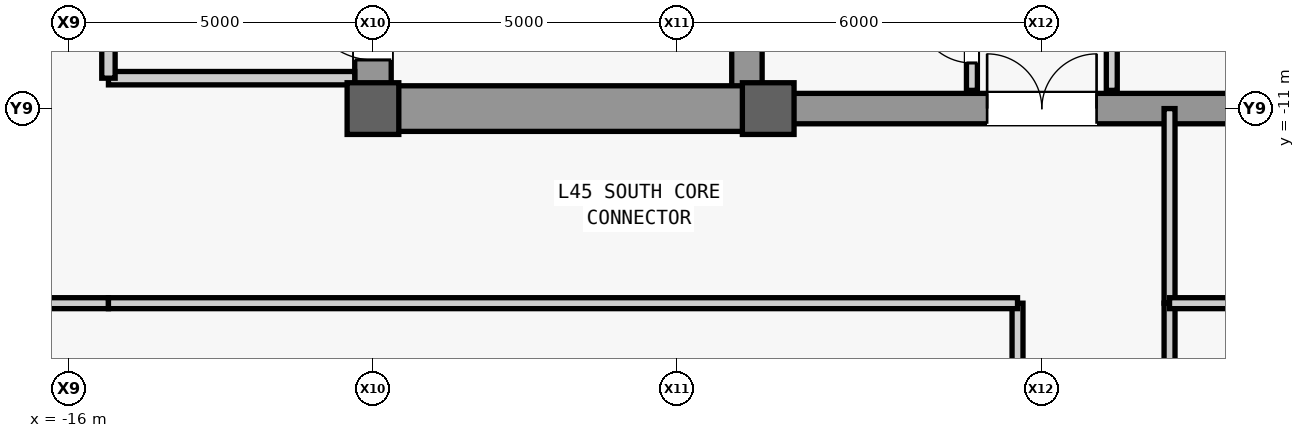
"""IFC4 building model, lengths in metres.
Left out: names, types, materials, properties, quantities, classifications, styles, units other than length and angle.
Written with IfcOpenShell. Run it as: python <this file> out.ifc"""

import sys

from ifc_helpers import new_model, si_unit, direction, frame, frame_2d, origin, origin_2d, place, context, subcontext, project, spatial, rectangle, extrude, source, transform, mapped, element, fill, save


model = new_model("IFC4")
c1 = context("Model", 3, precision=1e-05, world=origin(), true_north=direction((0.0, 1.0)))
c2 = subcontext(c1, "Body", "Model", "MODEL_VIEW")
j1 = project(units=[si_unit("LENGTHUNIT", "METRE"), si_unit("PLANEANGLEUNIT", "RADIAN")], contexts=[c1])
p1 = place(None, origin())
s1 = spatial("IfcSite", under=j1, at=p1, CompositionType="ELEMENT")
p2 = place(p1, origin())
s2 = spatial("IfcBuilding", under=s1, at=p2, CompositionType="ELEMENT")
p3 = place(p2, frame((0.0, 0.0, 195.1)))
s3 = spatial("IfcBuildingStorey", under=s2, at=p3, CompositionType="ELEMENT", Elevation=195.1)
m1 = source(origin(), c2, "Body", "SweptSolid", [
    extrude(rectangle(XDim=22.0, YDim=0.6, at=frame_2d((11.0, 0.0))), origin(), (0.0, 0.0, 1.0), 3.78),
])
p4 = place(p3, frame((-11.0, -11.0, 0.0), z_axis=(0.0, 0.0, 1.0), x_axis=(0.0, 1.0, 0.0)))
e1 = element("IfcWall", 1, at=p4, inside=s3, PredefinedType="SHEAR", context=c2, shape_type="MappedRepresentation", body=[
    mapped(m1, transform((0.0, 0.0, 0.0), scale=1.0)),
])
m2 = source(origin(), c2, "Body", "SweptSolid", [
    extrude(rectangle(XDim=1.1, YDim=2.2, at=frame_2d((0.55, 1.1))), frame((0.0, 0.31, 0.0), z_axis=(0.0, -1.0, 0.0), x_axis=(1.0, 0.0, 0.0)), (0.0, 0.0, 1.0), 0.62),
])
p5 = place(p4, frame((0.8, 0.0, 0.0)))
e2 = element("IfcOpeningElement", 2, at=p5, cuts=e1, PredefinedType="OPENING", context=c2, shape_type="MappedRepresentation", body=[
    mapped(m2, transform((0.0, 0.0, 0.0), scale=1.0)),
])
p6 = place(p4, frame((12.5, 0.0, 0.0)))
e3 = element("IfcOpeningElement", 3, at=p6, cuts=e1, PredefinedType="OPENING", context=c2, shape_type="MappedRepresentation", body=[
    mapped(m2, transform((0.0, 0.0, 0.0), scale=1.0)),
])
m3 = source(origin(), c2, "Body", "SweptSolid", [
    extrude(rectangle(XDim=0.9, YDim=2.15, at=frame_2d((0.45, 1.075))), frame((0.0, 0.31, 0.0), z_axis=(0.0, -1.0, 0.0), x_axis=(1.0, 0.0, 0.0)), (0.0, 0.0, 1.0), 0.62),
])
p7 = place(p4, frame((6.2, 0.0, 0.0)))
e4 = element("IfcOpeningElement", 4, at=p7, cuts=e1, PredefinedType="OPENING", context=c2, shape_type="MappedRepresentation", body=[
    mapped(m3, transform((0.0, 0.0, 0.0), scale=1.0)),
])
p8 = place(p4, frame((8.525, 0.0, 0.0)))
e5 = element("IfcOpeningElement", 5, at=p8, cuts=e1, PredefinedType="OPENING", context=c2, shape_type="MappedRepresentation", body=[
    mapped(m3, transform((0.0, 0.0, 0.0), scale=1.0)),
])
m4 = source(origin(), c2, "Body", "SweptSolid", [
    extrude(rectangle(XDim=1.3, YDim=2.3, at=frame_2d((0.65, 1.15))), frame((0.0, 0.31, 0.0), z_axis=(0.0, -1.0, 0.0), x_axis=(1.0, 0.0, 0.0)), (0.0, 0.0, 1.0), 0.62),
])
p9 = place(p4, frame((2.7, 0.0, 0.0)))
e6 = element("IfcOpeningElement", 6, at=p9, cuts=e1, PredefinedType="OPENING", context=c2, shape_type="MappedRepresentation", body=[
    mapped(m4, transform((0.0, 0.0, 0.0), scale=1.0)),
])
m5 = source(origin(), c2, "Body", "SweptSolid", [
    extrude(rectangle(XDim=21.4, YDim=0.5, at=frame_2d((10.7, 0.0))), origin(), (0.0, 0.0, 1.0), 3.78),
])
p10 = place(p3, frame((-4.85, -10.7, 0.0), z_axis=(0.0, 0.0, 1.0), x_axis=(0.0, 1.0, 0.0)))
e7 = element("IfcWall", 7, at=p10, inside=s3, PredefinedType="SHEAR", context=c2, shape_type="MappedRepresentation", body=[
    mapped(m5, transform((0.0, 0.0, 0.0), scale=1.0)),
])
m6 = source(origin(), c2, "Body", "SweptSolid", [
    extrude(rectangle(XDim=5.85, YDim=0.75, at=frame_2d((2.925, 0.0))), origin(), (0.0, 0.0, 1.0), 3.78),
])
p11 = place(p3, frame((-10.7, -11.0, 0.0), z_axis=(0.0, 0.0, 1.0), x_axis=(1.0, 0.0, 0.0)))
e8 = element("IfcWall", 8, at=p11, inside=s3, PredefinedType="SHEAR", context=c2, shape_type="MappedRepresentation", body=[
    mapped(m6, transform((0.0, 0.0, 0.0), scale=1.0)),
])
m7 = source(origin(), c2, "Body", "SweptSolid", [
    extrude(rectangle(XDim=9.2, YDim=0.5, at=frame_2d((4.6, 0.0))), origin(), (0.0, 0.0, 1.0), 3.78),
])
p12 = place(p3, frame((-4.6, -11.0, 0.0), z_axis=(0.0, 0.0, 1.0), x_axis=(1.0, 0.0, 0.0)))
e9 = element("IfcWall", 9, at=p12, inside=s3, PredefinedType="SHEAR", context=c2, shape_type="MappedRepresentation", body=[
    mapped(m7, transform((0.0, 0.0, 0.0), scale=1.0)),
])
m8 = source(origin(), c2, "Body", "SweptSolid", [
    extrude(rectangle(XDim=1.8, YDim=2.25, at=frame_2d((0.9, 1.125))), frame((0.0, 0.26, 0.0), z_axis=(0.0, -1.0, 0.0), x_axis=(1.0, 0.0, 0.0)), (0.0, 0.0, 1.0), 0.52),
])
p13 = place(p12, frame((3.7, 0.0, 0.0)))
e10 = element("IfcOpeningElement", 10, at=p13, cuts=e9, PredefinedType="OPENING", context=c2, shape_type="MappedRepresentation", body=[
    mapped(m8, transform((0.0, 0.0, 0.0), scale=1.0)),
])
m9 = source(origin(), c2, "Body", "SweptSolid", [
    extrude(rectangle(XDim=0.85, YDim=0.85, at=origin_2d()), origin(), (0.0, 0.0, 1.0), 4.0),
])
for number, where, z_axis, x_axis in (
    (11, (-11.0, -11.0, 0.0), (0.0, 0.0, 1.0), (1.0, 0.0, 0.0)),
    (12, (-4.5, -11.0, 0.0), (0.0, 0.0, 1.0), (1.0, 0.0, 0.0)),
):
    element("IfcColumn", number, at=place(p3, frame(where, z_axis=z_axis, x_axis=x_axis)), inside=s3, PredefinedType="COLUMN", context=c2, shape_type="MappedRepresentation", body=[
        mapped(m9, transform((0.0, 0.0, 0.0), scale=1.0)),
    ])
m10 = source(origin(), c2, "Body", "SweptSolid", [
    extrude(rectangle(XDim=4.05, YDim=0.22, at=frame_2d((2.025, 0.0))), origin(), (0.0, 0.0, 1.0), 3.78),
])
p14 = place(p3, frame((-15.35, -10.5, 0.0), z_axis=(0.0, 0.0, 1.0), x_axis=(1.0, 0.0, 0.0)))
e13 = element("IfcWall", 13, at=p14, inside=s3, PredefinedType="PARTITIONING", context=c2, shape_type="MappedRepresentation", body=[
    mapped(m10, transform((0.0, 0.0, 0.0), scale=1.0)),
])
m11 = source(origin(), c2, "Body", "SweptSolid", [
    extrude(rectangle(XDim=4.4, YDim=0.22, at=frame_2d((2.2, 0.0))), origin(), (0.0, 0.0, 1.0), 3.78),
])
p15 = place(p3, frame((-15.35, -10.5, 0.0), z_axis=(0.0, 0.0, 1.0), x_axis=(0.0, 1.0, 0.0)))
e14 = element("IfcWall", 14, at=p15, inside=s3, PredefinedType="PARTITIONING", context=c2, shape_type="MappedRepresentation", body=[
    mapped(m11, transform((0.0, 0.0, 0.0), scale=1.0)),
])
m12 = source(origin(), c2, "Body", "SweptSolid", [
    extrude(rectangle(XDim=1.2, YDim=2.2, at=frame_2d((0.6, 1.1))), frame((0.0, 0.12, 0.0), z_axis=(0.0, -1.0, 0.0), x_axis=(1.0, 0.0, 0.0)), (0.0, 0.0, 1.0), 0.24),
])
p16 = place(p15, frame((1.6, 0.0, 0.0)))
e15 = element("IfcOpeningElement", 15, at=p16, cuts=e14, PredefinedType="OPENING", context=c2, shape_type="MappedRepresentation", body=[
    mapped(m12, transform((0.0, 0.0, 0.0), scale=1.0)),
])
m13 = source(origin(), c2, "Body", "SweptSolid", [
    extrude(rectangle(XDim=5.4, YDim=0.18, at=frame_2d((2.7, 0.0))), origin(), (0.0, 0.0, 1.0), 3.78),
])
p17 = place(p3, frame((-1.15, -10.7, 0.0), z_axis=(0.0, 0.0, 1.0), x_axis=(0.0, 1.0, 0.0)))
e16 = element("IfcWall", 16, at=p17, inside=s3, PredefinedType="PARTITIONING", context=c2, shape_type="MappedRepresentation", body=[
    mapped(m13, transform((0.0, 0.0, 0.0), scale=1.0)),
])
m14 = source(origin(), c2, "Body", "SweptSolid", [
    extrude(rectangle(XDim=0.9, YDim=2.15, at=frame_2d((0.45, 1.075))), frame((0.0, 0.1, 0.0), z_axis=(0.0, -1.0, 0.0), x_axis=(1.0, 0.0, 0.0)), (0.0, 0.0, 1.0), 0.2),
])
p18 = place(p17, frame((0.45, 0.0, 0.0)))
e17 = element("IfcOpeningElement", 17, at=p18, cuts=e16, PredefinedType="OPENING", context=c2, shape_type="MappedRepresentation", body=[
    mapped(m14, transform((0.0, 0.0, 0.0), scale=1.0)),
])
p19 = place(p17, frame((2.25, 0.0, 0.0)))
e18 = element("IfcOpeningElement", 18, at=p19, cuts=e16, PredefinedType="OPENING", context=c2, shape_type="MappedRepresentation", body=[
    mapped(m14, transform((0.0, 0.0, 0.0), scale=1.0)),
])
p20 = place(p17, frame((4.05, 0.0, 0.0)))
e19 = element("IfcOpeningElement", 19, at=p20, cuts=e16, PredefinedType="OPENING", context=c2, shape_type="MappedRepresentation", body=[
    mapped(m14, transform((0.0, 0.0, 0.0), scale=1.0)),
])
p21 = place(p3, frame((1.15, -10.7, 0.0), z_axis=(0.0, 0.0, 1.0), x_axis=(0.0, 1.0, 0.0)))
e20 = element("IfcWall", 20, at=p21, inside=s3, PredefinedType="PARTITIONING", context=c2, shape_type="MappedRepresentation", body=[
    mapped(m13, transform((0.0, 0.0, 0.0), scale=1.0)),
])
p22 = place(p21, frame((0.95, 0.0, 0.0)))
e21 = element("IfcOpeningElement", 21, at=p22, cuts=e20, PredefinedType="OPENING", context=c2, shape_type="MappedRepresentation", body=[
    mapped(m14, transform((0.0, 0.0, 0.0), scale=1.0)),
])
p23 = place(p21, frame((3.65, 0.0, 0.0)))
e22 = element("IfcOpeningElement", 22, at=p23, cuts=e20, PredefinedType="OPENING", context=c2, shape_type="MappedRepresentation", body=[
    mapped(m14, transform((0.0, 0.0, 0.0), scale=1.0)),
])
m15 = source(origin(), c2, "Body", "SweptSolid", [
    extrude(rectangle(XDim=2.45, YDim=0.18, at=frame_2d((1.225, 0.0))), origin(), (0.0, 0.0, 1.0), 3.78),
])
p24 = place(p3, frame((-17.8, -14.2, 0.0), z_axis=(0.0, 0.0, 1.0), x_axis=(1.0, 0.0, 0.0)))
e23 = element("IfcWall", 23, at=p24, inside=s3, PredefinedType="PARTITIONING", context=c2, shape_type="MappedRepresentation", body=[
    mapped(m15, transform((0.0, 0.0, 0.0), scale=1.0)),
])
m16 = source(origin(), c2, "Body", "SweptSolid", [
    extrude(rectangle(XDim=3.2, YDim=0.18, at=frame_2d((1.6, 0.0))), origin(), (0.0, 0.0, 1.0), 3.78),
])
p25 = place(p3, frame((2.1, -14.2, 0.0), z_axis=(0.0, 0.0, 1.0), x_axis=(0.0, 1.0, 0.0)))
e24 = element("IfcWall", 24, at=p25, inside=s3, PredefinedType="PARTITIONING", context=c2, shape_type="MappedRepresentation", body=[
    mapped(m16, transform((0.0, 0.0, 0.0), scale=1.0)),
])
m17 = source(origin(), c2, "Body", "SweptSolid", [
    extrude(rectangle(XDim=15.8, YDim=0.18, at=frame_2d((7.9, 0.0))), origin(), (0.0, 0.0, 1.0), 3.78),
])
p26 = place(p3, frame((-0.4, -30.0, 0.0), z_axis=(0.0, 0.0, 1.0), x_axis=(0.0, 1.0, 0.0)))
e25 = element("IfcWall", 25, at=p26, inside=s3, PredefinedType="PARTITIONING", context=c2, shape_type="MappedRepresentation", body=[
    mapped(m17, transform((0.0, 0.0, 0.0), scale=1.0)),
])
m18 = source(origin(), c2, "Body", "SweptSolid", [
    extrude(rectangle(XDim=1.05, YDim=2.2, at=frame_2d((0.525, 1.1))), frame((0.0, 0.1, 0.0), z_axis=(0.0, -1.0, 0.0), x_axis=(1.0, 0.0, 0.0)), (0.0, 0.0, 1.0), 0.2),
])
p27 = place(p26, frame((3.425, 0.0, 0.0)))
e26 = element("IfcOpeningElement", 26, at=p27, cuts=e25, PredefinedType="OPENING", context=c2, shape_type="MappedRepresentation", body=[
    mapped(m18, transform((0.0, 0.0, 0.0), scale=1.0)),
])
m19 = source(origin(), c2, "Body", "SweptSolid", [
    extrude(rectangle(XDim=14.95, YDim=0.18, at=frame_2d((7.475, 0.0))), origin(), (0.0, 0.0, 1.0), 3.78),
])
p28 = place(p3, frame((-15.35, -14.2, 0.0), z_axis=(0.0, 0.0, 1.0), x_axis=(1.0, 0.0, 0.0)))
e27 = element("IfcWall", 27, at=p28, inside=s3, PredefinedType="PARTITIONING", context=c2, shape_type="MappedRepresentation", body=[
    mapped(m19, transform((0.0, 0.0, 0.0), scale=1.0)),
])
p29 = place(p3, frame((2.1, -30.0, 0.0), z_axis=(0.0, 0.0, 1.0), x_axis=(0.0, 1.0, 0.0)))
e28 = element("IfcWall", 28, at=p29, inside=s3, PredefinedType="PARTITIONING", context=c2, shape_type="MappedRepresentation", body=[
    mapped(m17, transform((0.0, 0.0, 0.0), scale=1.0)),
])
p30 = place(p29, frame((3.425, 0.0, 0.0)))
e29 = element("IfcOpeningElement", 29, at=p30, cuts=e28, PredefinedType="OPENING", context=c2, shape_type="MappedRepresentation", body=[
    mapped(m18, transform((0.0, 0.0, 0.0), scale=1.0)),
])
m20 = source(origin(), c2, "Body", "SweptSolid", [
    extrude(rectangle(XDim=13.25, YDim=0.18, at=frame_2d((6.625, 0.0))), origin(), (0.0, 0.0, 1.0), 3.78),
])
p31 = place(p3, frame((2.1, -14.2, 0.0), z_axis=(0.0, 0.0, 1.0), x_axis=(1.0, 0.0, 0.0)))
e30 = element("IfcWall", 30, at=p31, inside=s3, PredefinedType="PARTITIONING", context=c2, shape_type="MappedRepresentation", body=[
    mapped(m20, transform((0.0, 0.0, 0.0), scale=1.0)),
])
m21 = source(origin(), c2, "Body", "SweptSolid", [
    extrude(rectangle(XDim=1.1, YDim=2.2, at=frame_2d((0.55, 1.1))), frame((0.0, 0.025, 0.0), z_axis=(0.0, -1.0, 0.0), x_axis=(1.0, 0.0, 0.0)), (0.0, 0.0, 1.0), 0.05),
])
p32 = place(p5, origin())
e31 = element("IfcDoor", 31, at=p32, inside=s3, OperationType="SINGLE_SWING_RIGHT", PredefinedType="DOOR", context=c2, shape_type="MappedRepresentation", body=[
    mapped(m21, transform((0.0, 0.0, 0.0), scale=1.0)),
])
fill(e2, e31)
m22 = source(origin(), c2, "Body", "SweptSolid", [
    extrude(rectangle(XDim=0.9, YDim=2.15, at=frame_2d((0.45, 1.075))), frame((0.0, 0.025, 0.0), z_axis=(0.0, -1.0, 0.0), x_axis=(1.0, 0.0, 0.0)), (0.0, 0.0, 1.0), 0.05),
])
p33 = place(p18, origin())
e32 = element("IfcDoor", 32, at=p33, inside=s3, OperationType="SINGLE_SWING_RIGHT", PredefinedType="DOOR", context=c2, shape_type="MappedRepresentation", body=[
    mapped(m22, transform((0.0, 0.0, 0.0), scale=1.0)),
])
fill(e17, e32)
m23 = source(origin(), c2, "Body", "SweptSolid", [
    extrude(rectangle(XDim=1.8, YDim=2.25, at=frame_2d((0.9, 1.125))), frame((0.0, 0.025, 0.0), z_axis=(0.0, -1.0, 0.0), x_axis=(1.0, 0.0, 0.0)), (0.0, 0.0, 1.0), 0.05),
])
p34 = place(p13, origin())
e33 = element("IfcDoor", 33, at=p34, inside=s3, OperationType="SINGLE_SWING_LEFT", PredefinedType="DOOR", context=c2, shape_type="MappedRepresentation", body=[
    mapped(m23, transform((0.0, 0.0, 0.0), scale=1.0)),
])
fill(e10, e33)
save(model, sys.argv[1])
